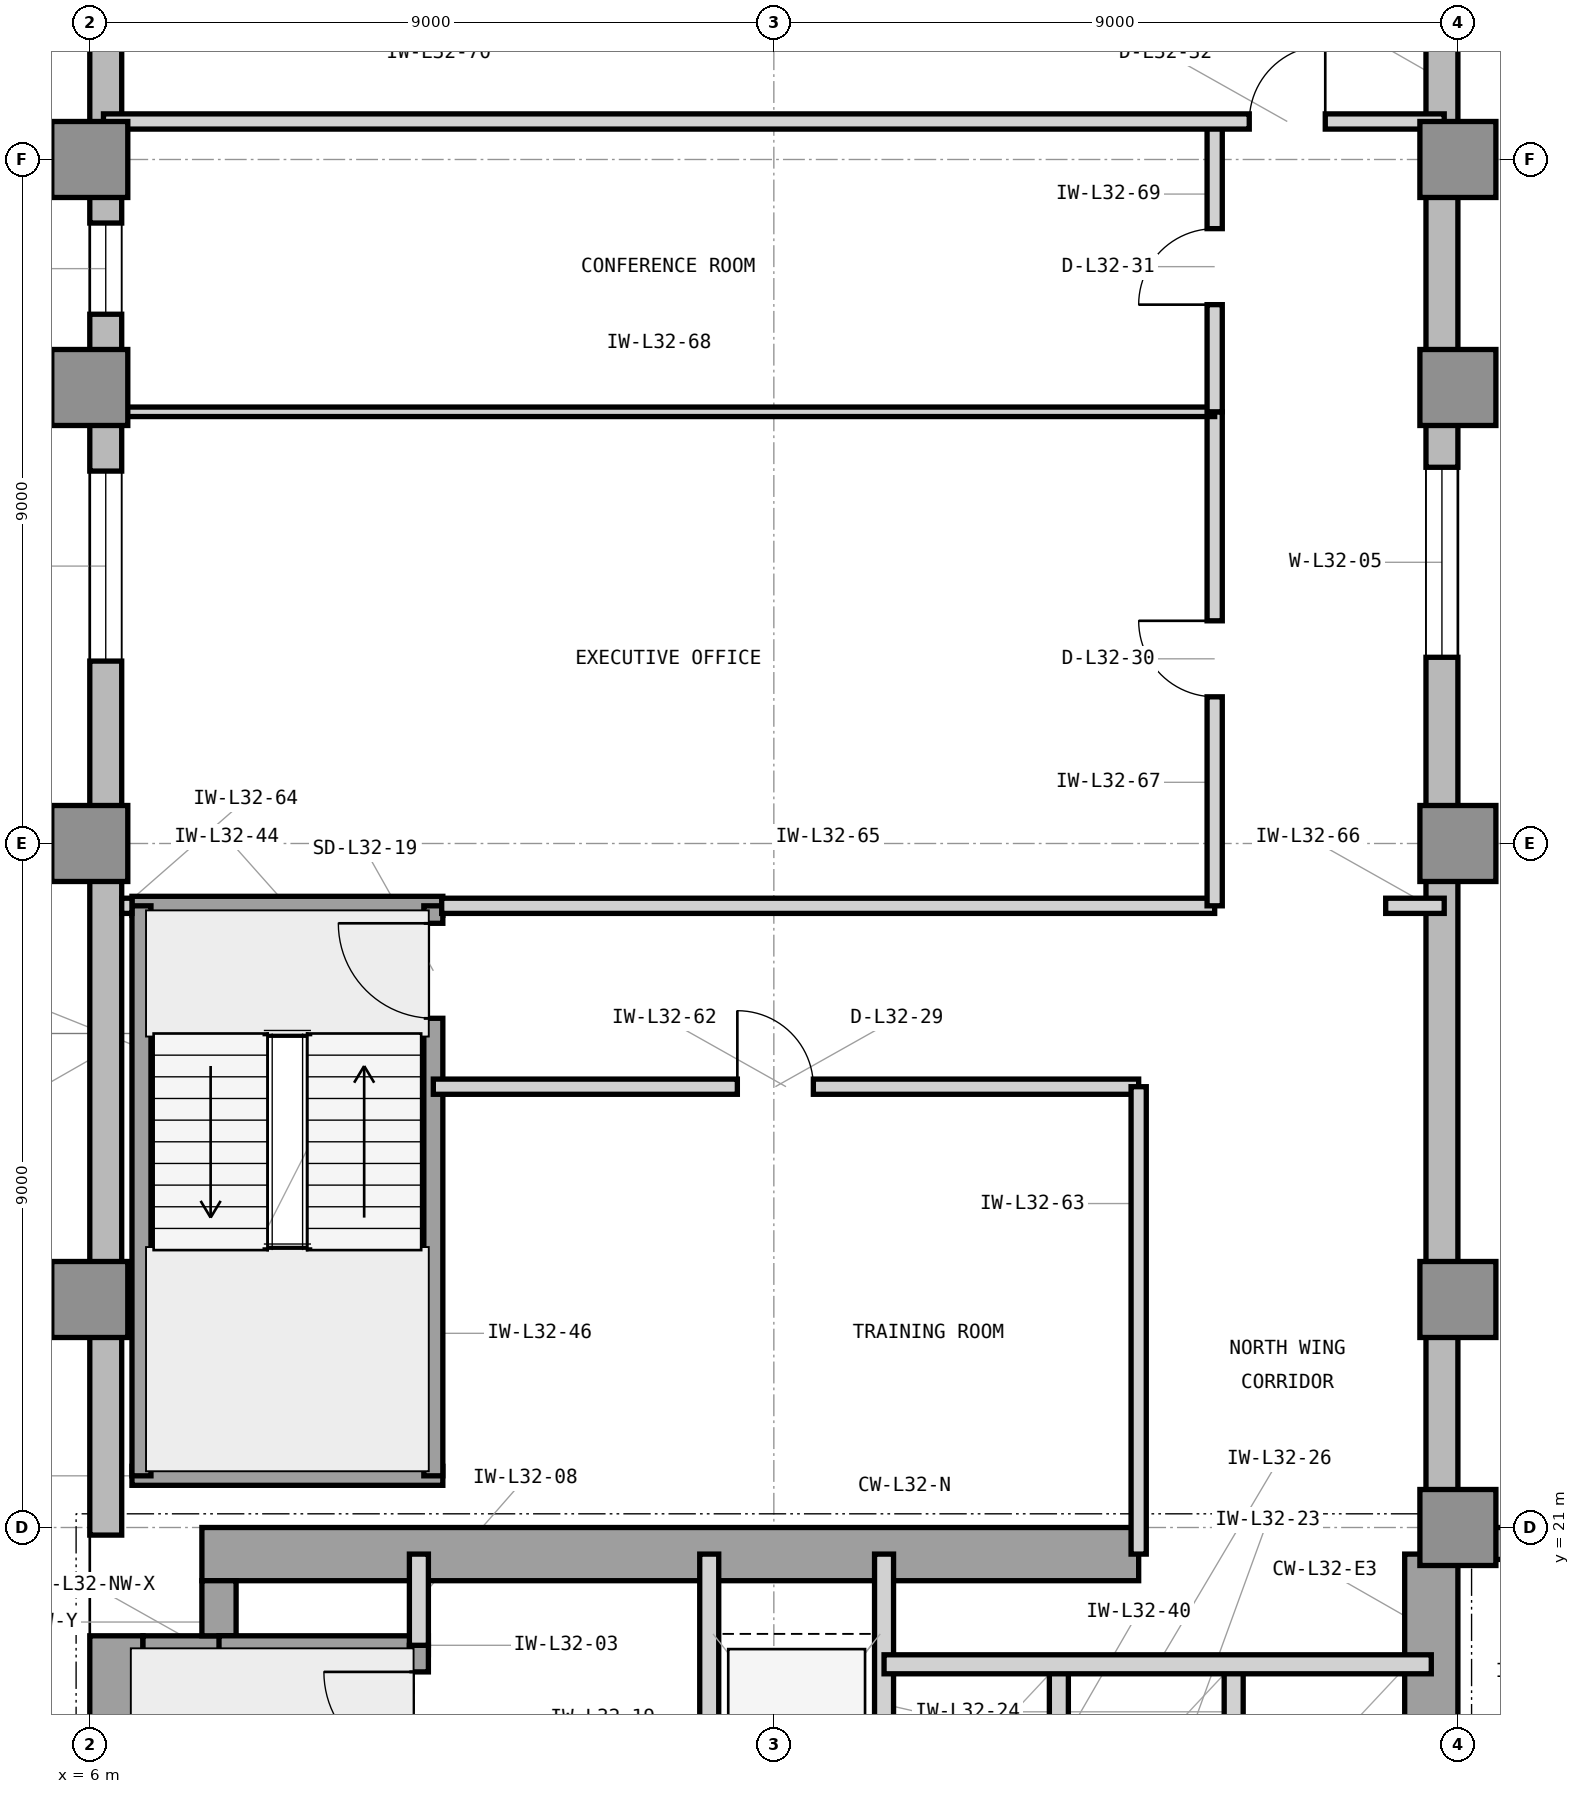
"""IFC4 building model, lengths in metres.
Left out: names, types, materials, properties, quantities, classifications, styles, units other than length and angle.
Written with IfcOpenShell. Run it as: python <this file> out.ifc"""

import sys

from ifc_helpers import new_model, si_unit, direction, frame, frame_2d, origin, origin_2d, place, context, subcontext, project, spatial, rectangle, extrude, element, fill, save


model = new_model("IFC4")
c1 = context("Model", 3, precision=1e-05, world=origin(), true_north=direction((0.0, 1.0)))
c2 = subcontext(c1, "Body", "Model", "MODEL_VIEW")
j1 = project(units=[si_unit("LENGTHUNIT", "METRE"), si_unit("PLANEANGLEUNIT", "RADIAN")], contexts=[c1])
p1 = place(None, origin())
s1 = spatial("IfcSite", under=j1, at=p1, CompositionType="ELEMENT")
p2 = place(p1, origin())
s2 = spatial("IfcBuilding", under=s1, at=p2, CompositionType="ELEMENT")
p3 = place(p2, frame((0.0, 0.0, 136.2)))
s3 = spatial("IfcBuildingStorey", under=s2, at=p3, CompositionType="ELEMENT", Elevation=136.2)
p4 = place(p3, frame((6.35, 4.425, 0.0), z_axis=(0.0, 0.0, 1.0), x_axis=(0.0, 1.0, 0.0)))
e1 = element("IfcWall", 1, at=p4, inside=s3, PredefinedType="SHEAR", context=c2, shape_type="SweptSolid", body=[
    extrude(rectangle(XDim=15.15, YDim=0.7, at=frame_2d((7.575, 0.0))), origin(), (0.0, 0.0, 1.0), 3.9),
])
p5 = place(p3, frame((7.475, 20.65, 0.0), z_axis=(0.0, 0.0, 1.0), x_axis=(1.0, 0.0, 0.0)))
e2 = element("IfcWall", 2, at=p5, inside=s3, PredefinedType="SHEAR", context=c2, shape_type="SweptSolid", body=[
    extrude(rectangle(XDim=12.325, YDim=0.7, at=frame_2d((6.163, 0.0))), origin(), (0.0, 0.0, 1.0), 3.9),
])
p6 = place(p3, frame((23.65, 16.6, 0.0), z_axis=(0.0, 0.0, 1.0), x_axis=(0.0, 1.0, 0.0)))
e3 = element("IfcWall", 3, at=p6, inside=s3, PredefinedType="SHEAR", context=c2, shape_type="SweptSolid", body=[
    extrude(rectangle(XDim=4.05, YDim=0.7, at=frame_2d((2.025, 0.0))), origin(), (0.0, 0.0, 1.0), 3.9),
])
p7 = place(p3, frame((6.7, 19.35, 0.0), z_axis=(0.0, 0.0, 1.0), x_axis=(1.0, 0.0, 0.0)))
e4 = element("IfcWall", 4, at=p7, inside=s3, PredefinedType="SHEAR", context=c2, shape_type="SweptSolid", body=[
    extrude(rectangle(XDim=1.225, YDim=0.45, at=frame_2d((0.613, 0.0))), origin(), (0.0, 0.0, 1.0), 3.9),
])
p8 = place(p3, frame((7.7, 19.575, 0.0), z_axis=(0.0, 0.0, 1.0), x_axis=(0.0, 1.0, 0.0)))
e5 = element("IfcWall", 5, at=p8, inside=s3, PredefinedType="SHEAR", context=c2, shape_type="SweptSolid", body=[
    extrude(rectangle(XDim=0.725, YDim=0.45, at=frame_2d((0.363, 0.0))), origin(), (0.0, 0.0, 1.0), 3.9),
])
for number, where, z_axis, x_axis in (
    (6, (24.0, 21.0, 0.0), (0.0, 0.0, 1.0), (1.0, 0.0, 0.0)),
    (7, (6.0, 24.0, 0.0), (0.0, 0.0, 1.0), (1.0, 0.0, 0.0)),
    (8, (24.0, 24.0, 0.0), (0.0, 0.0, 1.0), (1.0, 0.0, 0.0)),
    (9, (6.0, 30.0, 0.0), (0.0, 0.0, 1.0), (1.0, 0.0, 0.0)),
    (10, (24.0, 30.0, 0.0), (0.0, 0.0, 1.0), (1.0, 0.0, 0.0)),
    (11, (6.0, 36.0, 0.0), (0.0, 0.0, 1.0), (1.0, 0.0, 0.0)),
    (12, (24.0, 36.0, 0.0), (0.0, 0.0, 1.0), (1.0, 0.0, 0.0)),
    (13, (6.0, 39.0, 0.0), (0.0, 0.0, 1.0), (1.0, 0.0, 0.0)),
    (14, (24.0, 39.0, 0.0), (0.0, 0.0, 1.0), (1.0, 0.0, 0.0)),
):
    element("IfcColumn", number, at=place(p3, frame(where, z_axis=z_axis, x_axis=x_axis)), inside=s3, PredefinedType="COLUMN", context=c2, shape_type="SweptSolid", body=[
        extrude(rectangle(XDim=1.0, YDim=1.0, at=origin_2d()), origin(), (0.0, 0.0, 1.0), 3.9),
    ])
p9 = place(p3, frame((58.4, 20.79, 0.0), z_axis=(0.0, 0.0, 1.0), x_axis=(-1.0, 0.0, 0.0)))
e15 = element("IfcWall", 15, at=p9, inside=s3, PredefinedType="STANDARD", context=c2, shape_type="SweptSolid", body=[
    extrude(rectangle(XDim=34.4, YDim=0.42, at=frame_2d((17.2, 0.0))), origin(), (0.0, 0.0, 1.0), 3.7),
])
p10 = place(p9, frame((20.864, 0.0, 0.85)))
e16 = element("IfcOpeningElement", 16, at=p10, cuts=e15, PredefinedType="OPENING", context=c2, shape_type="SweptSolid", body=[
    extrude(rectangle(XDim=2.5, YDim=2.25, at=frame_2d((1.25, 1.125))), frame((0.0, 0.22, 0.0), z_axis=(0.0, -1.0, 0.0), x_axis=(1.0, 0.0, 0.0)), (0.0, 0.0, 1.0), 0.44),
])
p11 = place(p9, frame((11.386, 0.0, 0.85)))
e17 = element("IfcOpeningElement", 17, at=p11, cuts=e15, PredefinedType="OPENING", context=c2, shape_type="SweptSolid", body=[
    extrude(rectangle(XDim=2.5, YDim=2.25, at=frame_2d((1.25, 1.125))), frame((0.0, 0.22, 0.0), z_axis=(0.0, -1.0, 0.0), x_axis=(1.0, 0.0, 0.0)), (0.0, 0.0, 1.0), 0.44),
])
p12 = place(p3, frame((23.79, 21.0, 0.0), z_axis=(0.0, 0.0, 1.0), x_axis=(0.0, 1.0, 0.0)))
e18 = element("IfcWall", 18, at=p12, inside=s3, PredefinedType="STANDARD", context=c2, shape_type="SweptSolid", body=[
    extrude(rectangle(XDim=25.4, YDim=0.42, at=frame_2d((12.7, 0.0))), origin(), (0.0, 0.0, 1.0), 3.7),
])
p13 = place(p12, frame((11.45, 0.0, 0.85)))
e19 = element("IfcOpeningElement", 19, at=p13, cuts=e18, PredefinedType="OPENING", context=c2, shape_type="SweptSolid", body=[
    extrude(rectangle(XDim=2.5, YDim=2.25, at=frame_2d((1.25, 1.125))), frame((0.0, 0.22, 0.0), z_axis=(0.0, -1.0, 0.0), x_axis=(1.0, 0.0, 0.0)), (0.0, 0.0, 1.0), 0.44),
])
p14 = place(p3, frame((6.21, 46.4, 0.0), z_axis=(0.0, 0.0, 1.0), x_axis=(0.0, -1.0, 0.0)))
e20 = element("IfcWall", 20, at=p14, inside=s3, PredefinedType="STANDARD", context=c2, shape_type="SweptSolid", body=[
    extrude(rectangle(XDim=25.5, YDim=0.42, at=frame_2d((12.75, 0.0))), origin(), (0.0, 0.0, 1.0), 3.7),
])
p15 = place(p14, frame((11.5, 0.0, 0.85)))
e21 = element("IfcOpeningElement", 21, at=p15, cuts=e20, PredefinedType="OPENING", context=c2, shape_type="SweptSolid", body=[
    extrude(rectangle(XDim=2.5, YDim=2.25, at=frame_2d((1.25, 1.125))), frame((0.0, 0.22, 0.0), z_axis=(0.0, -1.0, 0.0), x_axis=(1.0, 0.0, 0.0)), (0.0, 0.0, 1.0), 0.44),
])
p16 = place(p14, frame((8.236, 0.0, 0.85)))
e22 = element("IfcOpeningElement", 22, at=p16, cuts=e20, PredefinedType="OPENING", context=c2, shape_type="SweptSolid", body=[
    extrude(rectangle(XDim=1.2, YDim=2.25, at=frame_2d((0.6, 1.125))), frame((0.0, 0.22, 0.0), z_axis=(0.0, -1.0, 0.0), x_axis=(1.0, 0.0, 0.0)), (0.0, 0.0, 1.0), 0.44),
])
p17 = place(p3, frame((7.7, 19.45, 0.0), z_axis=(0.0, 0.0, 1.0), x_axis=(1.0, 0.0, 0.0)))
e23 = element("IfcWall", 23, at=p17, inside=s3, PredefinedType="SHEAR", context=c2, shape_type="SweptSolid", body=[
    extrude(rectangle(XDim=2.755, YDim=0.25, at=frame_2d((1.377, 0.0))), origin(), (0.0, 0.0, 1.0), 3.9),
])
p18 = place(p3, frame((10.33, 12.0, 0.0), z_axis=(0.0, 0.0, 1.0), x_axis=(0.0, 1.0, 0.0)))
e24 = element("IfcWall", 24, at=p18, inside=s3, PredefinedType="SHEAR", context=c2, shape_type="SweptSolid", body=[
    extrude(rectangle(XDim=7.45, YDim=0.25, at=frame_2d((3.725, 0.0))), origin(), (0.0, 0.0, 1.0), 3.9),
])
p19 = place(p18, frame((5.85, 0.0, 0.0)))
e25 = element("IfcOpeningElement", 25, at=p19, cuts=e24, PredefinedType="OPENING", context=c2, shape_type="SweptSolid", body=[
    extrude(rectangle(XDim=1.25, YDim=2.2, at=frame_2d((0.625, 1.1))), frame((0.0, 0.135, 0.0), z_axis=(0.0, -1.0, 0.0), x_axis=(1.0, 0.0, 0.0)), (0.0, 0.0, 1.0), 0.27),
])
p20 = place(p3, frame((10.33, 19.45, 0.0), z_axis=(0.0, 0.0, 1.0), x_axis=(0.0, 1.0, 0.0)))
e26 = element("IfcWall", 26, at=p20, inside=s3, PredefinedType="PARTITIONING", context=c2, shape_type="SweptSolid", body=[
    extrude(rectangle(XDim=1.2, YDim=0.25, at=frame_2d((0.6, 0.0))), origin(), (0.0, 0.0, 1.0), 2.994),
])
for number, where, z_axis, x_axis in (
    (27, (14.15, 16.7, 0.0), (0.0, 0.0, 1.0), (0.0, 1.0, 0.0)),
    (28, (16.45, 16.7, 0.0), (0.0, 0.0, 1.0), (0.0, 1.0, 0.0)),
):
    element("IfcWall", number, at=place(p3, frame(where, z_axis=z_axis, x_axis=x_axis)), inside=s3, PredefinedType="PARTITIONING", context=c2, shape_type="SweptSolid", body=[
        extrude(rectangle(XDim=3.95, YDim=0.25, at=frame_2d((1.975, 0.0))), origin(), (0.0, 0.0, 1.0), 3.69),
    ])
for number, where, z_axis, x_axis in (
    (29, (18.75, 16.7, 0.0), (0.0, 0.0, 1.0), (0.0, 1.0, 0.0)),
    (30, (21.05, 16.7, 0.0), (0.0, 0.0, 1.0), (0.0, 1.0, 0.0)),
):
    element("IfcWall", number, at=place(p3, frame(where, z_axis=z_axis, x_axis=x_axis)), inside=s3, PredefinedType="PARTITIONING", context=c2, shape_type="SweptSolid", body=[
        extrude(rectangle(XDim=2.5, YDim=0.25, at=frame_2d((1.25, 0.0))), origin(), (0.0, 0.0, 1.0), 3.69),
    ])
p21 = place(p3, frame((16.45, 19.2, 0.0), z_axis=(0.0, 0.0, 1.0), x_axis=(1.0, 0.0, 0.0)))
e31 = element("IfcWall", 31, at=p21, inside=s3, PredefinedType="PARTITIONING", context=c2, shape_type="SweptSolid", body=[
    extrude(rectangle(XDim=7.2, YDim=0.25, at=frame_2d((3.6, 0.0))), origin(), (0.0, 0.0, 1.0), 3.69),
])
for number, where, z_axis, x_axis in (
    (32, (6.555, 21.68, 0.0), (0.0, 0.0, 1.0), (1.0, 0.0, 0.0)),
    (33, (6.555, 29.18, 0.0), (0.0, 0.0, 1.0), (1.0, 0.0, 0.0)),
):
    element("IfcWall", number, at=place(p3, frame(where, z_axis=z_axis, x_axis=x_axis)), inside=s3, PredefinedType="SHEAR", context=c2, shape_type="SweptSolid", body=[
        extrude(rectangle(XDim=4.09, YDim=0.25, at=frame_2d((2.045, 0.0))), origin(), (0.0, 0.0, 1.0), 3.9),
    ])
p22 = place(p3, frame((6.68, 21.68, 0.0), z_axis=(0.0, 0.0, 1.0), x_axis=(0.0, 1.0, 0.0)))
e34 = element("IfcWall", 34, at=p22, inside=s3, PredefinedType="SHEAR", context=c2, shape_type="SweptSolid", body=[
    extrude(rectangle(XDim=7.5, YDim=0.25, at=frame_2d((3.75, 0.0))), origin(), (0.0, 0.0, 1.0), 3.9),
])
p23 = place(p3, frame((10.52, 21.68, 0.0), z_axis=(0.0, 0.0, 1.0), x_axis=(0.0, 1.0, 0.0)))
e35 = element("IfcWall", 35, at=p23, inside=s3, PredefinedType="SHEAR", context=c2, shape_type="SweptSolid", body=[
    extrude(rectangle(XDim=7.5, YDim=0.25, at=frame_2d((3.75, 0.0))), origin(), (0.0, 0.0, 1.0), 3.9),
])
p24 = place(p23, frame((6.02, 0.0, 0.0)))
e36 = element("IfcOpeningElement", 36, at=p24, cuts=e35, PredefinedType="OPENING", context=c2, shape_type="SweptSolid", body=[
    extrude(rectangle(XDim=1.25, YDim=2.2, at=frame_2d((0.625, 1.1))), frame((0.0, 0.135, 0.0), z_axis=(0.0, -1.0, 0.0), x_axis=(1.0, 0.0, 0.0)), (0.0, 0.0, 1.0), 0.27),
])
p25 = place(p3, frame((10.52, 26.8, 0.0), z_axis=(0.0, 0.0, 1.0), x_axis=(1.0, 0.0, 0.0)))
e37 = element("IfcWall", 37, at=p25, inside=s3, PredefinedType="PARTITIONING", context=c2, shape_type="SweptSolid", body=[
    extrude(rectangle(XDim=9.28, YDim=0.2, at=frame_2d((4.64, 0.0))), origin(), (0.0, 0.0, 1.0), 3.69),
])
p26 = place(p25, frame((4.0, 0.0, 0.0)))
e38 = element("IfcOpeningElement", 38, at=p26, cuts=e37, PredefinedType="OPENING", context=c2, shape_type="SweptSolid", body=[
    extrude(rectangle(XDim=1.0, YDim=2.15, at=frame_2d((0.5, 1.075))), frame((0.0, 0.11, 0.0), z_axis=(0.0, -1.0, 0.0), x_axis=(1.0, 0.0, 0.0)), (0.0, 0.0, 1.0), 0.22),
])
p27 = place(p3, frame((19.8, 20.65, 0.0), z_axis=(0.0, 0.0, 1.0), x_axis=(0.0, 1.0, 0.0)))
e39 = element("IfcWall", 39, at=p27, inside=s3, PredefinedType="PARTITIONING", context=c2, shape_type="SweptSolid", body=[
    extrude(rectangle(XDim=6.15, YDim=0.2, at=frame_2d((3.075, 0.0))), origin(), (0.0, 0.0, 1.0), 3.69),
])
p28 = place(p3, frame((6.42, 29.18, 0.0), z_axis=(0.0, 0.0, 1.0), x_axis=(1.0, 0.0, 0.0)))
e40 = element("IfcWall", 40, at=p28, inside=s3, PredefinedType="PARTITIONING", context=c2, shape_type="SweptSolid", body=[
    extrude(rectangle(XDim=0.135, YDim=0.2, at=frame_2d((0.067, 0.0))), origin(), (0.0, 0.0, 1.0), 3.69),
])
p29 = place(p3, frame((10.63, 29.18, 0.0), z_axis=(0.0, 0.0, 1.0), x_axis=(1.0, 0.0, 0.0)))
e41 = element("IfcWall", 41, at=p29, inside=s3, PredefinedType="PARTITIONING", context=c2, shape_type="SweptSolid", body=[
    extrude(rectangle(XDim=10.17, YDim=0.2, at=frame_2d((5.085, 0.0))), origin(), (0.0, 0.0, 1.0), 3.69),
])
p30 = place(p3, frame((23.05, 29.18, 0.0), z_axis=(0.0, 0.0, 1.0), x_axis=(1.0, 0.0, 0.0)))
e42 = element("IfcWall", 42, at=p30, inside=s3, PredefinedType="PARTITIONING", context=c2, shape_type="SweptSolid", body=[
    extrude(rectangle(XDim=0.77, YDim=0.2, at=frame_2d((0.385, 0.0))), origin(), (0.0, 0.0, 1.0), 3.69),
])
p31 = place(p3, frame((20.8, 29.18, 0.0), z_axis=(0.0, 0.0, 1.0), x_axis=(0.0, 1.0, 0.0)))
e43 = element("IfcWall", 43, at=p31, inside=s3, PredefinedType="PARTITIONING", context=c2, shape_type="SweptSolid", body=[
    extrude(rectangle(XDim=6.5, YDim=0.2, at=frame_2d((3.25, 0.0))), origin(), (0.0, 0.0, 1.0), 3.69),
])
p32 = place(p31, frame((2.75, 0.0, 0.0)))
e44 = element("IfcOpeningElement", 44, at=p32, cuts=e43, PredefinedType="OPENING", context=c2, shape_type="SweptSolid", body=[
    extrude(rectangle(XDim=1.0, YDim=2.15, at=frame_2d((0.5, 1.075))), frame((0.0, 0.11, 0.0), z_axis=(0.0, -1.0, 0.0), x_axis=(1.0, 0.0, 0.0)), (0.0, 0.0, 1.0), 0.22),
])
p33 = place(p3, frame((6.18, 35.68, 0.0), z_axis=(0.0, 0.0, 1.0), x_axis=(1.0, 0.0, 0.0)))
e45 = element("IfcWall", 45, at=p33, inside=s3, PredefinedType="PARTITIONING", context=c2, shape_type="SweptSolid", body=[
    extrude(rectangle(XDim=14.62, YDim=0.125, at=frame_2d((7.31, 0.0))), origin(), (0.0, 0.0, 1.0), 3.69),
])
p34 = place(p3, frame((20.8, 35.68, 0.0), z_axis=(0.0, 0.0, 1.0), x_axis=(0.0, 1.0, 0.0)))
e46 = element("IfcWall", 46, at=p34, inside=s3, PredefinedType="PARTITIONING", context=c2, shape_type="SweptSolid", body=[
    extrude(rectangle(XDim=3.82, YDim=0.2, at=frame_2d((1.91, 0.0))), origin(), (0.0, 0.0, 1.0), 3.69),
])
p35 = place(p34, frame((1.41, 0.0, 0.0)))
e47 = element("IfcOpeningElement", 47, at=p35, cuts=e46, PredefinedType="OPENING", context=c2, shape_type="SweptSolid", body=[
    extrude(rectangle(XDim=1.0, YDim=2.15, at=frame_2d((0.5, 1.075))), frame((0.0, 0.11, 0.0), z_axis=(0.0, -1.0, 0.0), x_axis=(1.0, 0.0, 0.0)), (0.0, 0.0, 1.0), 0.22),
])
p36 = place(p3, frame((6.18, 39.5, 0.0), z_axis=(0.0, 0.0, 1.0), x_axis=(1.0, 0.0, 0.0)))
e48 = element("IfcWall", 48, at=p36, inside=s3, PredefinedType="PARTITIONING", context=c2, shape_type="SweptSolid", body=[
    extrude(rectangle(XDim=17.64, YDim=0.2, at=frame_2d((8.82, 0.0))), origin(), (0.0, 0.0, 1.0), 3.69),
])
p37 = place(p36, frame((15.075, 0.0, 0.0)))
e49 = element("IfcOpeningElement", 49, at=p37, cuts=e48, PredefinedType="OPENING", context=c2, shape_type="SweptSolid", body=[
    extrude(rectangle(XDim=1.0, YDim=2.15, at=frame_2d((0.5, 1.075))), frame((0.0, 0.11, 0.0), z_axis=(0.0, -1.0, 0.0), x_axis=(1.0, 0.0, 0.0)), (0.0, 0.0, 1.0), 0.22),
])
p38 = place(p13, origin())
e50 = element("IfcWindow", 50, at=p38, inside=s3, PartitioningType="SINGLE_PANEL", PredefinedType="WINDOW", context=c2, shape_type="SweptSolid", body=[
    extrude(rectangle(XDim=2.5, YDim=2.25, at=frame_2d((1.25, 1.125))), frame((0.0, 0.11, 0.0), z_axis=(0.0, -1.0, 0.0), x_axis=(1.0, 0.0, 0.0)), (0.0, 0.0, 1.0), 0.06),
])
fill(e19, e50)
p39 = place(p15, origin())
e51 = element("IfcWindow", 51, at=p39, inside=s3, PartitioningType="SINGLE_PANEL", PredefinedType="WINDOW", context=c2, shape_type="SweptSolid", body=[
    extrude(rectangle(XDim=2.5, YDim=2.25, at=frame_2d((1.25, 1.125))), frame((0.0, 0.11, 0.0), z_axis=(0.0, -1.0, 0.0), x_axis=(1.0, 0.0, 0.0)), (0.0, 0.0, 1.0), 0.06),
])
fill(e21, e51)
p40 = place(p19, origin())
e52 = element("IfcDoor", 52, at=p40, inside=s3, OperationType="SINGLE_SWING_RIGHT", PredefinedType="DOOR", context=c2, shape_type="SweptSolid", body=[
    extrude(rectangle(XDim=1.25, YDim=2.2, at=frame_2d((0.625, 1.1))), frame((0.0, 0.025, 0.0), z_axis=(0.0, -1.0, 0.0), x_axis=(1.0, 0.0, 0.0)), (0.0, 0.0, 1.0), 0.05),
])
fill(e25, e52)
p41 = place(p24, origin())
e53 = element("IfcDoor", 53, at=p41, inside=s3, OperationType="SINGLE_SWING_RIGHT", PredefinedType="DOOR", context=c2, shape_type="SweptSolid", body=[
    extrude(rectangle(XDim=1.25, YDim=2.2, at=frame_2d((0.625, 1.1))), frame((0.0, 0.025, 0.0), z_axis=(0.0, -1.0, 0.0), x_axis=(1.0, 0.0, 0.0)), (0.0, 0.0, 1.0), 0.05),
])
fill(e36, e53)
p42 = place(p26, origin())
e54 = element("IfcDoor", 54, at=p42, inside=s3, OperationType="SINGLE_SWING_LEFT", PredefinedType="DOOR", context=c2, shape_type="SweptSolid", body=[
    extrude(rectangle(XDim=1.0, YDim=2.15, at=frame_2d((0.5, 1.075))), frame((0.0, 0.025, 0.0), z_axis=(0.0, -1.0, 0.0), x_axis=(1.0, 0.0, 0.0)), (0.0, 0.0, 1.0), 0.05),
])
fill(e38, e54)
p43 = place(p32, origin())
e55 = element("IfcDoor", 55, at=p43, inside=s3, OperationType="SINGLE_SWING_RIGHT", PredefinedType="DOOR", context=c2, shape_type="SweptSolid", body=[
    extrude(rectangle(XDim=1.0, YDim=2.15, at=frame_2d((0.5, 1.075))), frame((0.0, 0.025, 0.0), z_axis=(0.0, -1.0, 0.0), x_axis=(1.0, 0.0, 0.0)), (0.0, 0.0, 1.0), 0.05),
])
fill(e44, e55)
p44 = place(p35, origin())
e56 = element("IfcDoor", 56, at=p44, inside=s3, OperationType="SINGLE_SWING_LEFT", PredefinedType="DOOR", context=c2, shape_type="SweptSolid", body=[
    extrude(rectangle(XDim=1.0, YDim=2.15, at=frame_2d((0.5, 1.075))), frame((0.0, 0.025, 0.0), z_axis=(0.0, -1.0, 0.0), x_axis=(1.0, 0.0, 0.0)), (0.0, 0.0, 1.0), 0.05),
])
fill(e47, e56)
p45 = place(p37, origin())
e57 = element("IfcDoor", 57, at=p45, inside=s3, OperationType="SINGLE_SWING_RIGHT", PredefinedType="DOOR", context=c2, shape_type="SweptSolid", body=[
    extrude(rectangle(XDim=1.0, YDim=2.15, at=frame_2d((0.5, 1.075))), frame((0.0, 0.025, 0.0), z_axis=(0.0, -1.0, 0.0), x_axis=(1.0, 0.0, 0.0)), (0.0, 0.0, 1.0), 0.05),
])
fill(e49, e57)
p46 = place(p16, origin())
e58 = element("IfcWindow", 58, at=p46, inside=s3, PartitioningType="SINGLE_PANEL", PredefinedType="WINDOW", context=c2, shape_type="SweptSolid", body=[
    extrude(rectangle(XDim=1.2, YDim=2.25, at=frame_2d((0.6, 1.125))), frame((0.0, 0.11, 0.0), z_axis=(0.0, -1.0, 0.0), x_axis=(1.0, 0.0, 0.0)), (0.0, 0.0, 1.0), 0.06),
])
fill(e22, e58)
save(model, sys.argv[1])
